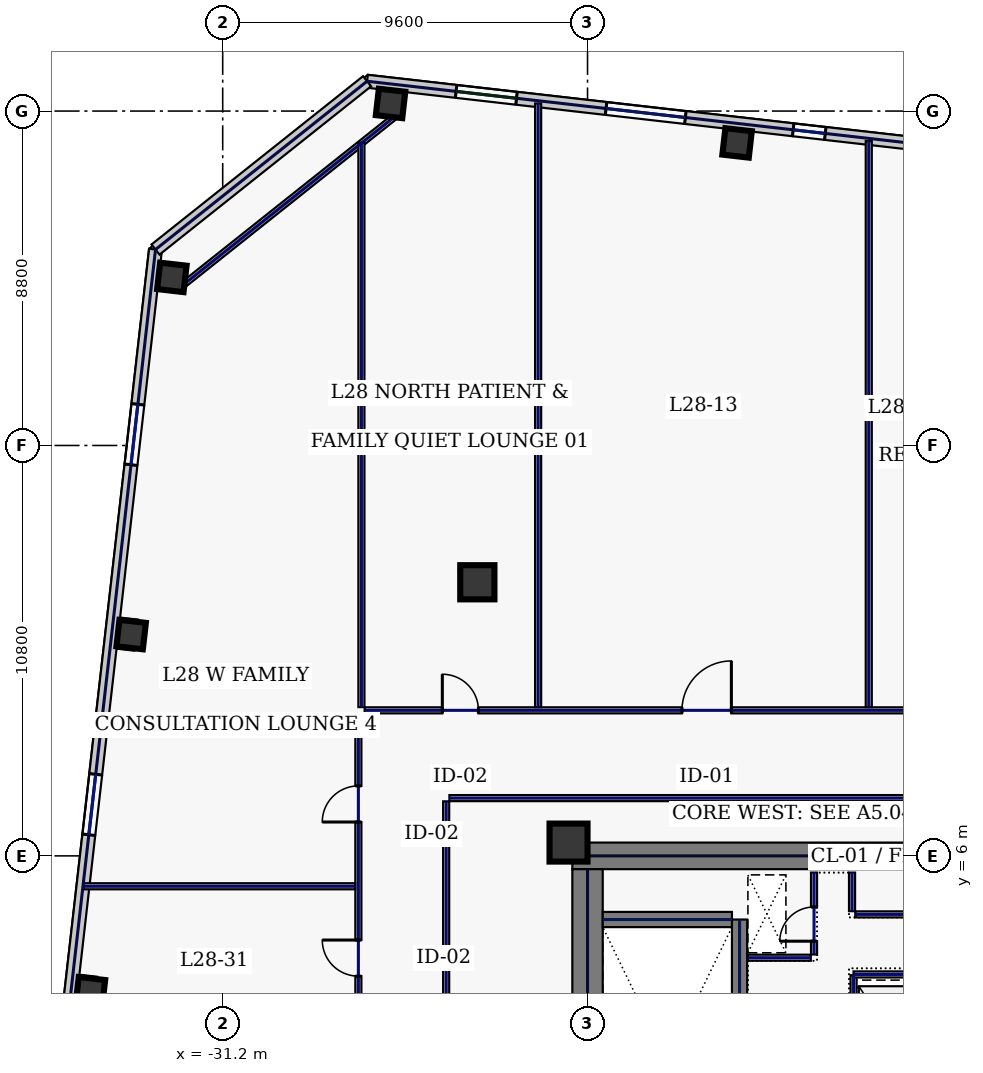
"""IFC4 building model, lengths in metres.
Left out: names, types, materials, properties, quantities, classifications, styles, units other than length and angle.
Written with IfcOpenShell. Run it as: python <this file> out.ifc"""

import sys

from ifc_helpers import new_model, si_unit, direction, frame, frame_2d, origin, origin_2d, place, context, subcontext, project, spatial, rectangle, hollow_rectangle, extrude, element, fill, save


model = new_model("IFC4")
c1 = context("Model", 3, precision=1e-05, world=origin(), true_north=direction((0.0, 1.0)))
c2 = subcontext(c1, "Body", "Model", "MODEL_VIEW")
j1 = project(units=[si_unit("LENGTHUNIT", "METRE"), si_unit("PLANEANGLEUNIT", "RADIAN")], contexts=[c1])
p1 = place(None, origin())
s1 = spatial("IfcSite", under=j1, at=p1, CompositionType="ELEMENT")
p2 = place(p1, origin())
s2 = spatial("IfcBuilding", under=s1, at=p2, CompositionType="ELEMENT")
p3 = place(p2, frame((0.0, 0.0, 125.4)))
s3 = spatial("IfcBuildingStorey", under=s2, at=p3, CompositionType="ELEMENT", Elevation=125.4)
p4 = place(p3, frame((-22.0, 6.0, 0.0), z_axis=(0.0, 0.0, 1.0), x_axis=(1.0, 0.0, 0.0)))
e1 = element("IfcWall", 1, at=p4, inside=s3, PredefinedType="SHEAR", context=c2, shape_type="SweptSolid", body=[
    extrude(rectangle(XDim=11.55, YDim=0.7, at=frame_2d((5.775, 0.0))), origin(), (0.0, 0.0, 1.0), 3.74),
])
p5 = place(p3, frame((-21.6, -5.65, 0.0), z_axis=(0.0, 0.0, 1.0), x_axis=(0.0, 1.0, 0.0)))
e2 = element("IfcWall", 2, at=p5, inside=s3, PredefinedType="SHEAR", context=c2, shape_type="SweptSolid", body=[
    extrude(rectangle(XDim=11.3, YDim=0.8, at=frame_2d((5.65, 0.0))), origin(), (0.0, 0.0, 1.0), 3.74),
])
p6 = place(p3, frame((-17.6, -4.325, 0.0), z_axis=(0.0, 0.0, 1.0), x_axis=(0.0, 1.0, 0.0)))
e3 = element("IfcWall", 3, at=p6, inside=s3, PredefinedType="SHEAR", context=c2, shape_type="SweptSolid", body=[
    extrude(rectangle(XDim=8.65, YDim=0.4, at=frame_2d((4.325, 0.0))), origin(), (0.0, 0.0, 1.0), 3.74),
])
p7 = place(p6, frame((0.25, 0.0, 0.0)))
e4 = element("IfcOpeningElement", 4, at=p7, cuts=e3, PredefinedType="OPENING", context=c2, shape_type="SweptSolid", body=[
    extrude(rectangle(XDim=1.1, YDim=2.2, at=frame_2d((0.55, 1.1))), frame((0.0, 0.21, 0.0), z_axis=(0.0, -1.0, 0.0), x_axis=(1.0, 0.0, 0.0)), (0.0, 0.0, 1.0), 0.42),
])
p8 = place(p3, frame((-21.2, 4.325, 0.0), z_axis=(0.0, 0.0, 1.0), x_axis=(1.0, 0.0, 0.0)))
e5 = element("IfcWall", 5, at=p8, inside=s3, PredefinedType="SHEAR", context=c2, shape_type="SweptSolid", body=[
    extrude(rectangle(XDim=3.4, YDim=0.4, at=frame_2d((1.7, 0.0))), origin(), (0.0, 0.0, 1.0), 3.74),
])
p9 = place(p3, frame((-22.1, 6.35, 0.0), z_axis=(0.0, 0.0, 1.0), x_axis=(1.0, 0.0, 0.0)))
e6 = element("IfcColumn", 6, at=p9, inside=s3, PredefinedType="COLUMN", context=c2, shape_type="SweptSolid", body=[
    extrude(hollow_rectangle(XDim=1.0, YDim=1.0, WallThickness=0.045, at=origin_2d()), origin(), (0.0, 0.0, 1.0), 3.74),
])
p10 = place(p3, frame((-24.5, 13.2, 0.0), z_axis=(0.0, 0.0, 1.0), x_axis=(1.0, 0.0, 0.0)))
e7 = element("IfcColumn", 7, at=p10, inside=s3, PredefinedType="COLUMN", context=c2, shape_type="SweptSolid", body=[
    extrude(hollow_rectangle(XDim=0.9, YDim=0.9, WallThickness=0.04, at=origin_2d()), origin(), (0.0, 0.0, 1.0), 3.74),
])
for number, where, z_axis, x_axis in (
    (8, (-17.665, 24.762, 0.0), (0.0, 0.0, 1.0), (0.994, -0.113, 0.0)),
    (9, (-26.783, 25.801, 0.0), (0.0, 0.0, 1.0), (0.994, -0.113, 0.0)),
    (10, (-32.538, 21.223, 0.0), (0.0, 0.0, 1.0), (0.994, -0.113, 0.0)),
    (11, (-33.609, 11.824, 0.0), (0.0, 0.0, 1.0), (0.994, -0.113, 0.0)),
    (12, (-34.68, 2.425, 0.0), (0.0, 0.0, 1.0), (0.994, -0.113, 0.0)),
):
    element("IfcColumn", number, at=place(p3, frame(where, z_axis=z_axis, x_axis=x_axis)), inside=s3, PredefinedType="COLUMN", context=c2, shape_type="SweptSolid", body=[
        extrude(hollow_rectangle(XDim=0.7, YDim=0.7, WallThickness=0.032, at=origin_2d()), origin(), (0.0, 0.0, 1.0), 3.74),
    ])
p11 = place(p3, frame((-6.314, 23.982, 0.0), z_axis=(0.0, 0.0, 1.0), x_axis=(-0.993571362037, 0.113207546299, 0.0)))
e13 = element("IfcWall", 13, at=p11, inside=s3, PredefinedType="STANDARD", context=c2, shape_type="SweptSolid", body=[
    extrude(rectangle(XDim=21.223, YDim=0.34, at=frame_2d((10.611, 0.0))), origin(), (0.0, 0.0, 1.0), 3.74),
])
p12 = place(p11, frame((17.265, 0.0, 0.22)))
e14 = element("IfcOpeningElement", 14, at=p12, cuts=e13, PredefinedType="OPENING", context=c2, shape_type="SweptSolid", body=[
    extrude(rectangle(XDim=1.6, YDim=1.2, at=frame_2d((0.8, 0.6))), frame((0.0, 0.18, 0.0), z_axis=(0.0, -1.0, 0.0), x_axis=(1.0, 0.0, 0.0)), (0.0, 0.0, 1.0), 0.36),
])
p13 = place(p11, frame((12.794, 0.0, 0.67)))
e15 = element("IfcOpeningElement", 15, at=p13, cuts=e13, PredefinedType="OPENING", context=c2, shape_type="SweptSolid", body=[
    extrude(rectangle(XDim=2.1, YDim=2.2, at=frame_2d((1.05, 1.1))), frame((0.0, 0.18, 0.0), z_axis=(0.0, -1.0, 0.0), x_axis=(1.0, 0.0, 0.0)), (0.0, 0.0, 1.0), 0.36),
])
p14 = place(p11, frame((9.088, 0.0, 0.67)))
e16 = element("IfcOpeningElement", 16, at=p14, cuts=e13, PredefinedType="OPENING", context=c2, shape_type="SweptSolid", body=[
    extrude(rectangle(XDim=0.85, YDim=1.85, at=frame_2d((0.425, 0.925))), frame((0.0, 0.18, 0.0), z_axis=(0.0, -1.0, 0.0), x_axis=(1.0, 0.0, 0.0)), (0.0, 0.0, 1.0), 0.36),
])
p15 = place(p11, frame((3.616, 0.0, 0.67)))
e17 = element("IfcOpeningElement", 17, at=p15, cuts=e13, PredefinedType="OPENING", context=c2, shape_type="SweptSolid", body=[
    extrude(rectangle(XDim=2.1, YDim=2.2, at=frame_2d((1.05, 1.1))), frame((0.0, 0.18, 0.0), z_axis=(0.0, -1.0, 0.0), x_axis=(1.0, 0.0, 0.0)), (0.0, 0.0, 1.0), 0.36),
])
p16 = place(p3, frame((-32.968, 21.957, 0.0), z_axis=(0.0, 0.0, 1.0), x_axis=(-0.113201605824, -0.993572038877, 0.0)))
e18 = element("IfcWall", 18, at=p16, inside=s3, PredefinedType="STANDARD", context=c2, shape_type="SweptSolid", body=[
    extrude(rectangle(XDim=39.2, YDim=0.34, at=frame_2d((19.6, 0.0))), origin(), (0.0, 0.0, 1.0), 3.74),
])
p17 = place(p16, frame((4.1, 0.0, 0.58)))
e19 = element("IfcOpeningElement", 19, at=p17, cuts=e18, PredefinedType="OPENING", context=c2, shape_type="SweptSolid", body=[
    extrude(rectangle(XDim=1.6, YDim=2.3, at=frame_2d((0.8, 1.15))), frame((0.0, 0.18, 0.0), z_axis=(0.0, -1.0, 0.0), x_axis=(1.0, 0.0, 0.0)), (0.0, 0.0, 1.0), 0.36),
])
p18 = place(p16, frame((13.9, 0.0, 0.58)))
e20 = element("IfcOpeningElement", 20, at=p18, cuts=e18, PredefinedType="OPENING", context=c2, shape_type="SweptSolid", body=[
    extrude(rectangle(XDim=1.6, YDim=2.3, at=frame_2d((0.8, 1.15))), frame((0.0, 0.18, 0.0), z_axis=(0.0, -1.0, 0.0), x_axis=(1.0, 0.0, 0.0)), (0.0, 0.0, 1.0), 0.36),
])
p19 = place(p16, frame((23.7, 0.0, 0.58)))
e21 = element("IfcOpeningElement", 21, at=p19, cuts=e18, PredefinedType="OPENING", context=c2, shape_type="SweptSolid", body=[
    extrude(rectangle(XDim=1.6, YDim=2.3, at=frame_2d((0.8, 1.15))), frame((0.0, 0.18, 0.0), z_axis=(0.0, -1.0, 0.0), x_axis=(1.0, 0.0, 0.0)), (0.0, 0.0, 1.0), 0.36),
])
p20 = place(p16, frame((33.5, 0.0, 0.58)))
e22 = element("IfcOpeningElement", 22, at=p20, cuts=e18, PredefinedType="OPENING", context=c2, shape_type="SweptSolid", body=[
    extrude(rectangle(XDim=1.6, YDim=2.3, at=frame_2d((0.8, 1.15))), frame((0.0, 0.18, 0.0), z_axis=(0.0, -1.0, 0.0), x_axis=(1.0, 0.0, 0.0)), (0.0, 0.0, 1.0), 0.36),
])
p21 = place(p3, frame((-27.401, 26.385, 0.0), z_axis=(0.0, 0.0, 1.0), x_axis=(-0.78261359446, -0.622507800567, 0.0)))
e23 = element("IfcWall", 23, at=p21, inside=s3, PredefinedType="STANDARD", context=c2, shape_type="SweptSolid", body=[
    extrude(rectangle(XDim=7.114, YDim=0.34, at=frame_2d((3.557, 0.0))), origin(), (0.0, 0.0, 1.0), 3.74),
])
p22 = place(p3, frame((-14.6, 0.12, 0.0), z_axis=(0.0, 0.0, 1.0), x_axis=(0.0, 1.0, 0.0)))
e24 = element("IfcWall", 24, at=p22, inside=s3, PredefinedType="PARTITIONING", context=c2, shape_type="SweptSolid", body=[
    extrude(rectangle(XDim=2.74, YDim=0.16, at=frame_2d((1.37, 0.0))), origin(), (0.0, 0.0, 1.0), 3.74),
])
p23 = place(p22, frame((0.77, 0.0, 0.0)))
e25 = element("IfcOpeningElement", 25, at=p23, cuts=e24, PredefinedType="OPENING", context=c2, shape_type="SweptSolid", body=[
    extrude(rectangle(XDim=1.2, YDim=2.2, at=frame_2d((0.6, 1.1))), frame((0.0, 0.09, 0.0), z_axis=(0.0, -1.0, 0.0), x_axis=(1.0, 0.0, 0.0)), (0.0, 0.0, 1.0), 0.18),
])
p24 = place(p3, frame((-14.6, 2.88, 0.0), z_axis=(0.0, 0.0, 1.0), x_axis=(1.0, 0.0, 0.0)))
e26 = element("IfcWall", 26, at=p24, inside=s3, PredefinedType="PARTITIONING", context=c2, shape_type="SweptSolid", body=[
    extrude(rectangle(XDim=1.76, YDim=0.16, at=frame_2d((0.88, 0.0))), origin(), (0.0, 0.0, 1.0), 3.74),
])
p25 = place(p3, frame((-15.64, 3.405, 0.0), z_axis=(0.0, 0.0, 1.0), x_axis=(0.0, 1.0, 0.0)))
e27 = element("IfcWall", 27, at=p25, inside=s3, PredefinedType="PARTITIONING", context=c2, shape_type="SweptSolid", body=[
    extrude(rectangle(XDim=2.155, YDim=0.16, at=frame_2d((1.078, 0.0))), origin(), (0.0, 0.0, 1.0), 3.74),
])
p26 = place(p25, frame((0.35, 0.0, 0.0)))
e28 = element("IfcOpeningElement", 28, at=p26, cuts=e27, PredefinedType="OPENING", context=c2, shape_type="SweptSolid", body=[
    extrude(rectangle(XDim=0.9, YDim=2.2, at=frame_2d((0.45, 1.1))), frame((0.0, 0.09, 0.0), z_axis=(0.0, -1.0, 0.0), x_axis=(1.0, 0.0, 0.0)), (0.0, 0.0, 1.0), 0.18),
])
p27 = place(p3, frame((-17.38, 3.32, 0.0), z_axis=(0.0, 0.0, 1.0), x_axis=(1.0, 0.0, 0.0)))
e29 = element("IfcWall", 29, at=p27, inside=s3, PredefinedType="PARTITIONING", context=c2, shape_type="SweptSolid", body=[
    extrude(rectangle(XDim=1.655, YDim=0.16, at=frame_2d((0.827, 0.0))), origin(), (0.0, 0.0, 1.0), 3.74),
])
p28 = place(p3, frame((-14.555, 4.46, 0.0), z_axis=(0.0, 0.0, 1.0), x_axis=(1.0, 0.0, 0.0)))
e30 = element("IfcWall", 30, at=p28, inside=s3, PredefinedType="PARTITIONING", context=c2, shape_type="SweptSolid", body=[
    extrude(rectangle(XDim=3.755, YDim=0.16, at=frame_2d((1.877, 0.0))), origin(), (0.0, 0.0, 1.0), 3.74),
])
p29 = place(p28, frame((1.35, 0.0, 0.0)))
e31 = element("IfcOpeningElement", 31, at=p29, cuts=e30, PredefinedType="OPENING", context=c2, shape_type="SweptSolid", body=[
    extrude(rectangle(XDim=0.95, YDim=2.2, at=frame_2d((0.475, 1.1))), frame((0.0, 0.09, 0.0), z_axis=(0.0, -1.0, 0.0), x_axis=(1.0, 0.0, 0.0)), (0.0, 0.0, 1.0), 0.18),
])
p30 = place(p3, frame((-14.64, 4.545, 0.0), z_axis=(0.0, 0.0, 1.0), x_axis=(0.0, 1.0, 0.0)))
e32 = element("IfcWall", 32, at=p30, inside=s3, PredefinedType="PARTITIONING", context=c2, shape_type="SweptSolid", body=[
    extrude(rectangle(XDim=1.015, YDim=0.16, at=frame_2d((0.508, 0.0))), origin(), (0.0, 0.0, 1.0), 3.74),
])
p31 = place(p3, frame((-26.571, 25.535, 0.0), z_axis=(0.0, 0.0, 1.0), x_axis=(-0.782617962887, -0.622502308564, 0.0)))
e33 = element("IfcWall", 33, at=p31, inside=s3, PredefinedType="PARTITIONING", context=c2, shape_type="SweptSolid", body=[
    extrude(rectangle(XDim=7.354, YDim=0.16, at=frame_2d((3.677, 0.0))), origin(), (0.0, 0.0, 1.0), 3.74),
])
p32 = place(p3, frame((-27.63, -9.615, 0.0), z_axis=(0.0, 0.0, 1.0), x_axis=(0.0, 1.0, 0.0)))
e34 = element("IfcWall", 34, at=p32, inside=s3, PredefinedType="PARTITIONING", context=c2, shape_type="SweptSolid", body=[
    extrude(rectangle(XDim=19.28, YDim=0.16, at=frame_2d((9.64, 0.0))), origin(), (0.0, 0.0, 1.0), 3.74),
])
p33 = place(p32, frame((1.969, 0.0, 0.0)))
e35 = element("IfcOpeningElement", 35, at=p33, cuts=e34, PredefinedType="OPENING", context=c2, shape_type="SweptSolid", body=[
    extrude(rectangle(XDim=0.95, YDim=2.2, at=frame_2d((0.475, 1.1))), frame((0.0, 0.09, 0.0), z_axis=(0.0, -1.0, 0.0), x_axis=(1.0, 0.0, 0.0)), (0.0, 0.0, 1.0), 0.18),
])
p34 = place(p32, frame((6.95, 0.0, 0.0)))
e36 = element("IfcOpeningElement", 36, at=p34, cuts=e34, PredefinedType="OPENING", context=c2, shape_type="SweptSolid", body=[
    extrude(rectangle(XDim=0.95, YDim=2.2, at=frame_2d((0.475, 1.1))), frame((0.0, 0.09, 0.0), z_axis=(0.0, -1.0, 0.0), x_axis=(1.0, 0.0, 0.0)), (0.0, 0.0, 1.0), 0.18),
])
p35 = place(p32, frame((12.45, 0.0, 0.0)))
e37 = element("IfcOpeningElement", 37, at=p35, cuts=e34, PredefinedType="OPENING", context=c2, shape_type="SweptSolid", body=[
    extrude(rectangle(XDim=0.95, YDim=2.2, at=frame_2d((0.475, 1.1))), frame((0.0, 0.09, 0.0), z_axis=(0.0, -1.0, 0.0), x_axis=(1.0, 0.0, 0.0)), (0.0, 0.0, 1.0), 0.18),
])
p36 = place(p32, frame((16.506, 0.0, 0.0)))
e38 = element("IfcOpeningElement", 38, at=p36, cuts=e34, PredefinedType="OPENING", context=c2, shape_type="SweptSolid", body=[
    extrude(rectangle(XDim=0.95, YDim=2.2, at=frame_2d((0.475, 1.1))), frame((0.0, 0.09, 0.0), z_axis=(0.0, -1.0, 0.0), x_axis=(1.0, 0.0, 0.0)), (0.0, 0.0, 1.0), 0.18),
])
p37 = place(p3, frame((-27.465, 9.83, 0.0), z_axis=(0.0, 0.0, 1.0), x_axis=(1.0, 0.0, 0.0)))
e39 = element("IfcWall", 39, at=p37, inside=s3, PredefinedType="PARTITIONING", context=c2, shape_type="SweptSolid", body=[
    extrude(rectangle(XDim=54.93, YDim=0.16, at=frame_2d((27.465, 0.0))), origin(), (0.0, 0.0, 1.0), 3.74),
])
p38 = place(p37, frame((2.044, 0.0, 0.0)))
e40 = element("IfcOpeningElement", 40, at=p38, cuts=e39, PredefinedType="OPENING", context=c2, shape_type="SweptSolid", body=[
    extrude(rectangle(XDim=0.95, YDim=2.2, at=frame_2d((0.475, 1.1))), frame((0.0, 0.09, 0.0), z_axis=(0.0, -1.0, 0.0), x_axis=(1.0, 0.0, 0.0)), (0.0, 0.0, 1.0), 0.18),
])
p39 = place(p37, frame((8.35, 0.0, 0.0)))
e41 = element("IfcOpeningElement", 41, at=p39, cuts=e39, PredefinedType="OPENING", context=c2, shape_type="SweptSolid", body=[
    extrude(rectangle(XDim=1.3, YDim=2.2, at=frame_2d((0.65, 1.1))), frame((0.0, 0.09, 0.0), z_axis=(0.0, -1.0, 0.0), x_axis=(1.0, 0.0, 0.0)), (0.0, 0.0, 1.0), 0.18),
])
p40 = place(p37, frame((15.94, 0.0, 0.0)))
e42 = element("IfcOpeningElement", 42, at=p40, cuts=e39, PredefinedType="OPENING", context=c2, shape_type="SweptSolid", body=[
    extrude(rectangle(XDim=1.3, YDim=2.2, at=frame_2d((0.65, 1.1))), frame((0.0, 0.09, 0.0), z_axis=(0.0, -1.0, 0.0), x_axis=(1.0, 0.0, 0.0)), (0.0, 0.0, 1.0), 0.18),
])
p41 = place(p37, frame((21.815, 0.0, 0.0)))
e43 = element("IfcOpeningElement", 43, at=p41, cuts=e39, PredefinedType="OPENING", context=c2, shape_type="SweptSolid", body=[
    extrude(rectangle(XDim=1.15, YDim=2.2, at=frame_2d((0.575, 1.1))), frame((0.0, 0.09, 0.0), z_axis=(0.0, -1.0, 0.0), x_axis=(1.0, 0.0, 0.0)), (0.0, 0.0, 1.0), 0.18),
])
p42 = place(p37, frame((26.455, 0.0, 0.0)))
e44 = element("IfcOpeningElement", 44, at=p42, cuts=e39, PredefinedType="OPENING", context=c2, shape_type="SweptSolid", body=[
    extrude(rectangle(XDim=0.95, YDim=2.2, at=frame_2d((0.475, 1.1))), frame((0.0, 0.09, 0.0), z_axis=(0.0, -1.0, 0.0), x_axis=(1.0, 0.0, 0.0)), (0.0, 0.0, 1.0), 0.18),
])
p43 = place(p37, frame((32.335, 0.0, 0.0)))
e45 = element("IfcOpeningElement", 45, at=p43, cuts=e39, PredefinedType="OPENING", context=c2, shape_type="SweptSolid", body=[
    extrude(rectangle(XDim=0.95, YDim=2.2, at=frame_2d((0.475, 1.1))), frame((0.0, 0.09, 0.0), z_axis=(0.0, -1.0, 0.0), x_axis=(1.0, 0.0, 0.0)), (0.0, 0.0, 1.0), 0.18),
])
p44 = place(p37, frame((41.255, 0.0, 0.0)))
e46 = element("IfcOpeningElement", 46, at=p44, cuts=e39, PredefinedType="OPENING", context=c2, shape_type="SweptSolid", body=[
    extrude(rectangle(XDim=1.05, YDim=2.2, at=frame_2d((0.525, 1.1))), frame((0.0, 0.09, 0.0), z_axis=(0.0, -1.0, 0.0), x_axis=(1.0, 0.0, 0.0)), (0.0, 0.0, 1.0), 0.18),
])
p45 = place(p37, frame((50.356, 0.0, 0.0)))
e47 = element("IfcOpeningElement", 47, at=p45, cuts=e39, PredefinedType="OPENING", context=c2, shape_type="SweptSolid", body=[
    extrude(rectangle(XDim=0.95, YDim=2.2, at=frame_2d((0.475, 1.1))), frame((0.0, 0.09, 0.0), z_axis=(0.0, -1.0, 0.0), x_axis=(1.0, 0.0, 0.0)), (0.0, 0.0, 1.0), 0.18),
])
p46 = place(p3, frame((-10.665, 7.52, 0.0), z_axis=(0.0, 0.0, 1.0), x_axis=(-1.0, 0.0, 0.0)))
e48 = element("IfcWall", 48, at=p46, inside=s3, PredefinedType="PARTITIONING", context=c2, shape_type="SweptSolid", body=[
    extrude(rectangle(XDim=14.57, YDim=0.16, at=frame_2d((7.285, 0.0))), origin(), (0.0, 0.0, 1.0), 3.74),
])
p47 = place(p3, frame((-25.32, 7.435, 0.0), z_axis=(0.0, 0.0, 1.0), x_axis=(0.0, -1.0, 0.0)))
e49 = element("IfcWall", 49, at=p47, inside=s3, PredefinedType="PARTITIONING", context=c2, shape_type="SweptSolid", body=[
    extrude(rectangle(XDim=14.82, YDim=0.16, at=frame_2d((7.41, 0.0))), origin(), (0.0, 0.0, 1.0), 3.74),
])
p48 = place(p3, frame((-27.55, 9.915, 0.0), z_axis=(0.0, 0.0, 1.0), x_axis=(0.0, 1.0, 0.0)))
e50 = element("IfcWall", 50, at=p48, inside=s3, PredefinedType="PARTITIONING", context=c2, shape_type="SweptSolid", body=[
    extrude(rectangle(XDim=14.859, YDim=0.16, at=frame_2d((7.429, 0.0))), origin(), (0.0, 0.0, 1.0), 3.74),
])
p49 = place(p3, frame((-22.9, 9.915, 0.0), z_axis=(0.0, 0.0, 1.0), x_axis=(0.0, 1.0, 0.0)))
e51 = element("IfcWall", 51, at=p49, inside=s3, PredefinedType="PARTITIONING", context=c2, shape_type="SweptSolid", body=[
    extrude(rectangle(XDim=15.886, YDim=0.16, at=frame_2d((7.943, 0.0))), origin(), (0.0, 0.0, 1.0), 3.74),
])
p50 = place(p3, frame((-14.2, 9.915, 0.0), z_axis=(0.0, 0.0, 1.0), x_axis=(0.0, 1.0, 0.0)))
e52 = element("IfcWall", 52, at=p50, inside=s3, PredefinedType="PARTITIONING", context=c2, shape_type="SweptSolid", body=[
    extrude(rectangle(XDim=14.895, YDim=0.16, at=frame_2d((7.448, 0.0))), origin(), (0.0, 0.0, 1.0), 3.74),
])
p51 = place(p3, frame((-34.857, 5.2, 0.0), z_axis=(0.0, 0.0, 1.0), x_axis=(1.0, 0.0, 0.0)))
e53 = element("IfcWall", 53, at=p51, inside=s3, PredefinedType="PARTITIONING", context=c2, shape_type="SweptSolid", body=[
    extrude(rectangle(XDim=7.142, YDim=0.16, at=frame_2d((3.571, 0.0))), origin(), (0.0, 0.0, 1.0), 3.74),
])
p52 = place(p12, origin())
e54 = element("IfcWindow", 54, at=p52, inside=s3, PartitioningType="SINGLE_PANEL", PredefinedType="WINDOW", context=c2, shape_type="SweptSolid", body=[
    extrude(rectangle(XDim=1.6, YDim=1.2, at=frame_2d((0.8, 0.6))), frame((0.0, 0.03, 0.0), z_axis=(0.0, -1.0, 0.0), x_axis=(1.0, 0.0, 0.0)), (0.0, 0.0, 1.0), 0.06),
])
fill(e14, e54)
p53 = place(p13, origin())
e55 = element("IfcWindow", 55, at=p53, inside=s3, PartitioningType="SINGLE_PANEL", PredefinedType="WINDOW", context=c2, shape_type="SweptSolid", body=[
    extrude(rectangle(XDim=2.1, YDim=2.2, at=frame_2d((1.05, 1.1))), frame((0.0, 0.03, 0.0), z_axis=(0.0, -1.0, 0.0), x_axis=(1.0, 0.0, 0.0)), (0.0, 0.0, 1.0), 0.06),
])
fill(e15, e55)
p54 = place(p14, origin())
e56 = element("IfcWindow", 56, at=p54, inside=s3, PartitioningType="SINGLE_PANEL", PredefinedType="WINDOW", context=c2, shape_type="SweptSolid", body=[
    extrude(rectangle(XDim=0.85, YDim=1.85, at=frame_2d((0.425, 0.925))), frame((0.0, 0.03, 0.0), z_axis=(0.0, -1.0, 0.0), x_axis=(1.0, 0.0, 0.0)), (0.0, 0.0, 1.0), 0.06),
])
fill(e16, e56)
p55 = place(p17, origin())
e57 = element("IfcWindow", 57, at=p55, inside=s3, PartitioningType="SINGLE_PANEL", PredefinedType="WINDOW", context=c2, shape_type="SweptSolid", body=[
    extrude(rectangle(XDim=1.6, YDim=2.3, at=frame_2d((0.8, 1.15))), frame((0.0, 0.03, 0.0), z_axis=(0.0, -1.0, 0.0), x_axis=(1.0, 0.0, 0.0)), (0.0, 0.0, 1.0), 0.06),
])
fill(e19, e57)
p56 = place(p18, origin())
e58 = element("IfcWindow", 58, at=p56, inside=s3, PartitioningType="SINGLE_PANEL", PredefinedType="WINDOW", context=c2, shape_type="SweptSolid", body=[
    extrude(rectangle(XDim=1.6, YDim=2.3, at=frame_2d((0.8, 1.15))), frame((0.0, 0.03, 0.0), z_axis=(0.0, -1.0, 0.0), x_axis=(1.0, 0.0, 0.0)), (0.0, 0.0, 1.0), 0.06),
])
fill(e20, e58)
p57 = place(p26, origin())
e59 = element("IfcDoor", 59, at=p57, inside=s3, OperationType="SINGLE_SWING_LEFT", PredefinedType="DOOR", context=c2, shape_type="SweptSolid", body=[
    extrude(rectangle(XDim=0.9, YDim=2.2, at=frame_2d((0.45, 1.1))), frame((0.0, 0.025, 0.0), z_axis=(0.0, -1.0, 0.0), x_axis=(1.0, 0.0, 0.0)), (0.0, 0.0, 1.0), 0.05),
])
fill(e28, e59)
p58 = place(p38, origin())
e60 = element("IfcDoor", 60, at=p58, inside=s3, OperationType="SINGLE_SWING_LEFT", PredefinedType="DOOR", context=c2, shape_type="SweptSolid", body=[
    extrude(rectangle(XDim=0.95, YDim=2.2, at=frame_2d((0.475, 1.1))), frame((0.0, 0.025, 0.0), z_axis=(0.0, -1.0, 0.0), x_axis=(1.0, 0.0, 0.0)), (0.0, 0.0, 1.0), 0.05),
])
fill(e40, e60)
p59 = place(p39, origin())
e61 = element("IfcDoor", 61, at=p59, inside=s3, OperationType="SINGLE_SWING_RIGHT", PredefinedType="DOOR", context=c2, shape_type="SweptSolid", body=[
    extrude(rectangle(XDim=1.3, YDim=2.2, at=frame_2d((0.65, 1.1))), frame((0.0, 0.025, 0.0), z_axis=(0.0, -1.0, 0.0), x_axis=(1.0, 0.0, 0.0)), (0.0, 0.0, 1.0), 0.05),
])
fill(e41, e61)
p60 = place(p35, origin())
e62 = element("IfcDoor", 62, at=p60, inside=s3, OperationType="SINGLE_SWING_RIGHT", PredefinedType="DOOR", context=c2, shape_type="SweptSolid", body=[
    extrude(rectangle(XDim=0.95, YDim=2.2, at=frame_2d((0.475, 1.1))), frame((0.0, 0.025, 0.0), z_axis=(0.0, -1.0, 0.0), x_axis=(1.0, 0.0, 0.0)), (0.0, 0.0, 1.0), 0.05),
])
fill(e37, e62)
p61 = place(p36, origin())
e63 = element("IfcDoor", 63, at=p61, inside=s3, OperationType="SINGLE_SWING_LEFT", PredefinedType="DOOR", context=c2, shape_type="SweptSolid", body=[
    extrude(rectangle(XDim=0.95, YDim=2.2, at=frame_2d((0.475, 1.1))), frame((0.0, 0.025, 0.0), z_axis=(0.0, -1.0, 0.0), x_axis=(1.0, 0.0, 0.0)), (0.0, 0.0, 1.0), 0.05),
])
fill(e38, e63)
save(model, sys.argv[1])
